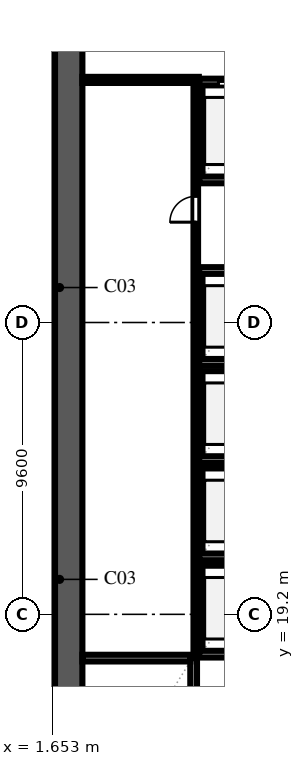
"""IFC4 building model, lengths in metres.
Left out: names, types, materials, properties, quantities, classifications, styles, units other than length and angle.
Written with IfcOpenShell. Run it as: python <this file> out.ifc"""

import sys

from ifc_helpers import new_model, si_unit, direction, frame, frame_2d, origin, place, context, subcontext, project, spatial, rectangle, extrude, element, fill, save


model = new_model("IFC4")
c1 = context("Model", 3, precision=1e-05, world=origin(), true_north=direction((0.0, 1.0)))
c2 = subcontext(c1, "Body", "Model", "MODEL_VIEW")
j1 = project(units=[si_unit("LENGTHUNIT", "METRE"), si_unit("PLANEANGLEUNIT", "RADIAN")], contexts=[c1])
p1 = place(None, origin())
s1 = spatial("IfcSite", under=j1, at=p1, CompositionType="ELEMENT")
p2 = place(p1, origin())
s2 = spatial("IfcBuilding", under=s1, at=p2, CompositionType="ELEMENT")
p3 = place(p2, frame((0.0, 0.0, 73.6)))
s3 = spatial("IfcBuildingStorey", under=s2, at=p3, CompositionType="ELEMENT", Elevation=73.6)
p4 = place(p3, frame((2.2, 9.15, 0.0), z_axis=(0.0, 0.0, 1.0), x_axis=(0.0, 1.0, 0.0)))
e1 = element("IfcWall", 1, at=p4, inside=s3, PredefinedType="SHEAR", context=c2, shape_type="SweptSolid", body=[
    extrude(rectangle(XDim=39.3, YDim=0.9, at=frame_2d((19.65, 0.0))), origin(), (0.0, 0.0, 1.0), 3.54),
])
p5 = place(p3, frame((6.31, 9.95, 0.0), z_axis=(0.0, 0.0, 1.0), x_axis=(0.0, 1.0, 0.0)))
e2 = element("IfcWall", 2, at=p5, inside=s3, PredefinedType="SOLIDWALL", context=c2, shape_type="SweptSolid", body=[
    extrude(rectangle(XDim=7.81, YDim=0.22, at=frame_2d((3.905, 0.0))), origin(), (0.0, 0.0, 1.0), 3.54),
])
p6 = place(p5, frame((0.14, 0.0, 0.0)))
e3 = element("IfcOpeningElement", 3, at=p6, cuts=e2, PredefinedType="OPENING", context=c2, shape_type="SweptSolid", body=[
    extrude(rectangle(XDim=1.1, YDim=2.2, at=frame_2d((0.55, 1.1))), frame((0.0, 0.122, 0.0), z_axis=(0.0, -1.0, 0.0), x_axis=(1.0, 0.0, 0.0)), (0.0, 0.0, 1.0), 0.244),
])
p7 = place(p3, frame((2.65, 17.76, 0.0), z_axis=(0.0, 0.0, 1.0), x_axis=(1.0, 0.0, 0.0)))
e4 = element("IfcWall", 4, at=p7, inside=s3, PredefinedType="SOLIDWALL", context=c2, shape_type="SweptSolid", body=[
    extrude(rectangle(XDim=3.55, YDim=0.22, at=frame_2d((1.775, 0.0))), origin(), (0.0, 0.0, 1.0), 3.54),
])
p8 = place(p3, frame((6.49, 18.11, 0.0), z_axis=(0.0, 0.0, 1.0), x_axis=(0.0, 1.0, 0.0)))
e5 = element("IfcWall", 5, at=p8, inside=s3, PredefinedType="SOLIDWALL", context=c2, shape_type="SweptSolid", body=[
    extrude(rectangle(XDim=2.58, YDim=0.22, at=frame_2d((1.29, 0.0))), origin(), (0.0, 0.0, 1.0), 3.54),
])
for number, where, z_axis, x_axis in (
    (6, (6.49, 17.89, 0.0), (0.0, 0.0, 1.0), (1.0, 0.0, 0.0)),
    (7, (6.49, 20.91, 0.0), (0.0, 0.0, 1.0), (1.0, 0.0, 0.0)),
):
    element("IfcWall", number, at=place(p3, frame(where, z_axis=z_axis, x_axis=x_axis)), inside=s3, PredefinedType="SOLIDWALL", context=c2, shape_type="SweptSolid", body=[
        extrude(rectangle(XDim=2.47, YDim=0.22, at=frame_2d((1.235, 0.0))), origin(), (0.0, 0.0, 1.0), 3.54),
    ])
p9 = place(p3, frame((6.49, 21.31, 0.0), z_axis=(0.0, 0.0, 1.0), x_axis=(0.0, 1.0, 0.0)))
e8 = element("IfcWall", 8, at=p9, inside=s3, PredefinedType="SOLIDWALL", context=c2, shape_type="SweptSolid", body=[
    extrude(rectangle(XDim=2.58, YDim=0.22, at=frame_2d((1.29, 0.0))), origin(), (0.0, 0.0, 1.0), 3.54),
])
for number, where, z_axis, x_axis in (
    (9, (6.49, 21.09, 0.0), (0.0, 0.0, 1.0), (1.0, 0.0, 0.0)),
    (10, (6.49, 24.11, 0.0), (0.0, 0.0, 1.0), (1.0, 0.0, 0.0)),
):
    element("IfcWall", number, at=place(p3, frame(where, z_axis=z_axis, x_axis=x_axis)), inside=s3, PredefinedType="SOLIDWALL", context=c2, shape_type="SweptSolid", body=[
        extrude(rectangle(XDim=2.47, YDim=0.22, at=frame_2d((1.235, 0.0))), origin(), (0.0, 0.0, 1.0), 3.54),
    ])
p10 = place(p3, frame((6.49, 24.51, 0.0), z_axis=(0.0, 0.0, 1.0), x_axis=(0.0, 1.0, 0.0)))
e11 = element("IfcWall", 11, at=p10, inside=s3, PredefinedType="SOLIDWALL", context=c2, shape_type="SweptSolid", body=[
    extrude(rectangle(XDim=2.58, YDim=0.22, at=frame_2d((1.29, 0.0))), origin(), (0.0, 0.0, 1.0), 3.54),
])
for number, where, z_axis, x_axis in (
    (12, (6.49, 24.29, 0.0), (0.0, 0.0, 1.0), (1.0, 0.0, 0.0)),
    (13, (6.49, 27.31, 0.0), (0.0, 0.0, 1.0), (1.0, 0.0, 0.0)),
):
    element("IfcWall", number, at=place(p3, frame(where, z_axis=z_axis, x_axis=x_axis)), inside=s3, PredefinedType="SOLIDWALL", context=c2, shape_type="SweptSolid", body=[
        extrude(rectangle(XDim=2.47, YDim=0.22, at=frame_2d((1.235, 0.0))), origin(), (0.0, 0.0, 1.0), 3.54),
    ])
p11 = place(p3, frame((6.49, 27.71, 0.0), z_axis=(0.0, 0.0, 1.0), x_axis=(0.0, 1.0, 0.0)))
e14 = element("IfcWall", 14, at=p11, inside=s3, PredefinedType="SOLIDWALL", context=c2, shape_type="SweptSolid", body=[
    extrude(rectangle(XDim=2.58, YDim=0.22, at=frame_2d((1.29, 0.0))), origin(), (0.0, 0.0, 1.0), 3.54),
])
for number, where, z_axis, x_axis in (
    (15, (6.49, 27.49, 0.0), (0.0, 0.0, 1.0), (1.0, 0.0, 0.0)),
    (16, (6.49, 30.51, 0.0), (0.0, 0.0, 1.0), (1.0, 0.0, 0.0)),
):
    element("IfcWall", number, at=place(p3, frame(where, z_axis=z_axis, x_axis=x_axis)), inside=s3, PredefinedType="SOLIDWALL", context=c2, shape_type="SweptSolid", body=[
        extrude(rectangle(XDim=2.47, YDim=0.22, at=frame_2d((1.235, 0.0))), origin(), (0.0, 0.0, 1.0), 3.54),
    ])
p12 = place(p3, frame((6.49, 33.71, 0.0), z_axis=(0.0, 0.0, 1.0), x_axis=(0.0, 1.0, 0.0)))
e17 = element("IfcWall", 17, at=p12, inside=s3, PredefinedType="SOLIDWALL", context=c2, shape_type="SweptSolid", body=[
    extrude(rectangle(XDim=2.78, YDim=0.22, at=frame_2d((1.39, 0.0))), origin(), (0.0, 0.0, 1.0), 3.54),
])
p13 = place(p3, frame((6.49, 33.49, 0.0), z_axis=(0.0, 0.0, 1.0), x_axis=(1.0, 0.0, 0.0)))
e18 = element("IfcWall", 18, at=p13, inside=s3, PredefinedType="SOLIDWALL", context=c2, shape_type="SweptSolid", body=[
    extrude(rectangle(XDim=2.47, YDim=0.22, at=frame_2d((1.235, 0.0))), origin(), (0.0, 0.0, 1.0), 3.54),
])
p14 = place(p3, frame((6.49, 36.71, 0.0), z_axis=(0.0, 0.0, 1.0), x_axis=(1.0, 0.0, 0.0)))
e19 = element("IfcWall", 19, at=p14, inside=s3, PredefinedType="SOLIDWALL", context=c2, shape_type="SweptSolid", body=[
    extrude(rectangle(XDim=2.47, YDim=0.22, at=frame_2d((1.235, 0.0))), origin(), (0.0, 0.0, 1.0), 3.54),
])
p15 = place(p14, frame((0.635, 0.0, 0.0)))
e20 = element("IfcOpeningElement", 20, at=p15, cuts=e19, PredefinedType="OPENING", context=c2, shape_type="SweptSolid", body=[
    extrude(rectangle(XDim=1.2, YDim=2.2, at=frame_2d((0.6, 1.1))), frame((0.0, 0.122, 0.0), z_axis=(0.0, -1.0, 0.0), x_axis=(1.0, 0.0, 0.0)), (0.0, 0.0, 1.0), 0.244),
])
p16 = place(p3, frame((2.65, 36.78, 0.0), z_axis=(0.0, 0.0, 1.0), x_axis=(1.0, 0.0, 0.0)))
e21 = element("IfcWall", 21, at=p16, inside=s3, PredefinedType="SOLIDWALL", context=c2, shape_type="SweptSolid", body=[
    extrude(rectangle(XDim=3.83, YDim=0.2, at=frame_2d((1.915, 0.0))), origin(), (0.0, 0.0, 1.0), 3.54),
])
p17 = place(p3, frame((6.38, 17.8, 0.0), z_axis=(0.0, 0.0, 1.0), x_axis=(0.0, 1.0, 0.0)))
e22 = element("IfcWall", 22, at=p17, inside=s3, PredefinedType="PARTITIONING", context=c2, shape_type="SweptSolid", body=[
    extrude(rectangle(XDim=18.98, YDim=0.15, at=frame_2d((9.49, 0.0))), origin(), (0.0, 0.0, 1.0), 3.54),
])
p18 = place(p17, frame((14.3, 0.0, 0.0)))
e23 = element("IfcOpeningElement", 23, at=p18, cuts=e22, PredefinedType="OPENING", context=c2, shape_type="SweptSolid", body=[
    extrude(rectangle(XDim=0.85, YDim=2.1, at=frame_2d((0.425, 1.05))), frame((0.0, 0.087, 0.0), z_axis=(0.0, -1.0, 0.0), x_axis=(1.0, 0.0, 0.0)), (0.0, 0.0, 1.0), 0.174),
])
p19 = place(p15, origin())
e24 = element("IfcDoor", 24, at=p19, inside=s3, OperationType="DOUBLE_DOOR_SLIDING", PredefinedType="DOOR", context=c2, shape_type="SweptSolid", body=[
    extrude(rectangle(XDim=1.2, YDim=2.2, at=frame_2d((0.6, 1.1))), frame((0.0, 0.025, 0.0), z_axis=(0.0, -1.0, 0.0), x_axis=(1.0, 0.0, 0.0)), (0.0, 0.0, 1.0), 0.05),
])
fill(e20, e24)
p20 = place(p18, origin())
e25 = element("IfcDoor", 25, at=p20, inside=s3, OperationType="SINGLE_SWING_LEFT", PredefinedType="DOOR", context=c2, shape_type="SweptSolid", body=[
    extrude(rectangle(XDim=0.85, YDim=2.1, at=frame_2d((0.425, 1.05))), frame((0.0, 0.025, 0.0), z_axis=(0.0, -1.0, 0.0), x_axis=(1.0, 0.0, 0.0)), (0.0, 0.0, 1.0), 0.05),
])
fill(e23, e25)
save(model, sys.argv[1])
